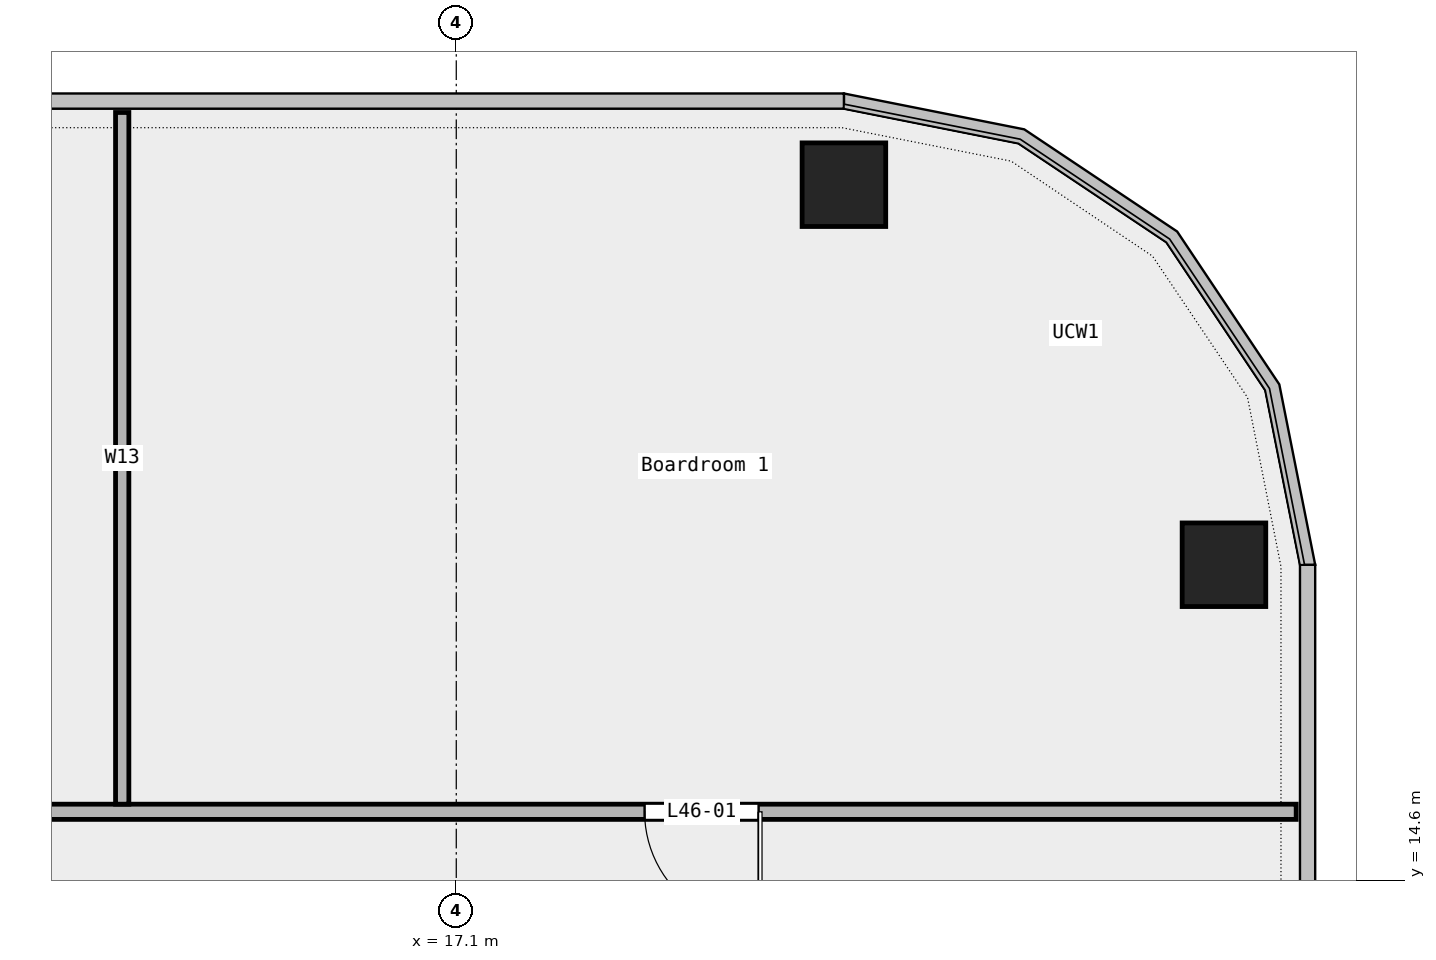
"""IFC4 building model, lengths in metres.
Left out: names, types, materials, properties, quantities, classifications, styles, units other than length and angle.
Written with IfcOpenShell. Run it as: python <this file> out.ifc"""

import sys

from ifc_helpers import new_model, si_unit, direction, frame, frame_2d, origin, origin_2d, place, context, subcontext, project, spatial, rectangle, extrude, element, fill, save


model = new_model("IFC4")
c1 = context("Model", 3, precision=1e-05, world=origin(), true_north=direction((0.0, 1.0)))
c2 = subcontext(c1, "Body", "Model", "MODEL_VIEW")
j1 = project(units=[si_unit("LENGTHUNIT", "METRE"), si_unit("PLANEANGLEUNIT", "RADIAN")], contexts=[c1])
p1 = place(None, origin())
s1 = spatial("IfcSite", under=j1, at=p1, CompositionType="ELEMENT")
p2 = place(p1, origin())
s2 = spatial("IfcBuilding", under=s1, at=p2, CompositionType="ELEMENT")
p3 = place(p2, frame((0.0, 0.0, 219.0)))
s3 = spatial("IfcBuildingStorey", under=s2, at=p3, CompositionType="ELEMENT", Elevation=219.0)
for number, where, z_axis, x_axis in (
    (1, (27.2, 18.75, 0.0), (0.0, 0.0, 1.0), (1.0, 0.0, 0.0)),
    (2, (22.2, 23.75, 0.0), (0.0, 0.0, 1.0), (1.0, 0.0, 0.0)),
):
    element("IfcColumn", number, at=place(p3, frame(where, z_axis=z_axis, x_axis=x_axis)), inside=s3, PredefinedType="COLUMN", context=c2, shape_type="SweptSolid", body=[
        extrude(rectangle(XDim=1.1, YDim=1.1, at=origin_2d()), origin(), (0.0, 0.0, 1.0), 3.6),
    ])
p4 = place(p3, frame((-17.76, 15.5, 0.0), z_axis=(0.0, 0.0, 1.0), x_axis=(1.0, 0.0, 0.0)))
e3 = element("IfcWall", 3, at=p4, inside=s3, PredefinedType="PARTITIONING", context=c2, shape_type="SweptSolid", body=[
    extrude(rectangle(XDim=45.91, YDim=0.2, at=frame_2d((22.955, 0.0))), origin(), (0.0, 0.0, 1.0), 3.6),
])
p5 = place(p4, frame((37.337, 0.0, 0.0)))
e4 = element("IfcOpeningElement", 4, at=p5, cuts=e3, PredefinedType="OPENING", context=c2, shape_type="SweptSolid", body=[
    extrude(rectangle(XDim=1.5, YDim=2.1, at=frame_2d((0.75, 1.05))), frame((0.0, 0.112, 0.0), z_axis=(0.0, -1.0, 0.0), x_axis=(1.0, 0.0, 0.0)), (0.0, 0.0, 1.0), 0.224),
])
p6 = place(p4, frame((24.633, 0.0, 0.0)))
e5 = element("IfcOpeningElement", 5, at=p6, cuts=e3, PredefinedType="OPENING", context=c2, shape_type="SweptSolid", body=[
    extrude(rectangle(XDim=1.5, YDim=2.1, at=frame_2d((0.75, 1.05))), frame((0.0, 0.112, 0.0), z_axis=(0.0, -1.0, 0.0), x_axis=(1.0, 0.0, 0.0)), (0.0, 0.0, 1.0), 0.224),
])
p7 = place(p4, frame((5.91, 0.0, 0.0)))
e6 = element("IfcOpeningElement", 6, at=p7, cuts=e3, PredefinedType="OPENING", context=c2, shape_type="SweptSolid", body=[
    extrude(rectangle(XDim=1.5, YDim=2.1, at=frame_2d((0.75, 1.05))), frame((0.0, 0.112, 0.0), z_axis=(0.0, -1.0, 0.0), x_axis=(1.0, 0.0, 0.0)), (0.0, 0.0, 1.0), 0.224),
])
p8 = place(p4, frame((16.21, 0.0, 0.0)))
e7 = element("IfcOpeningElement", 7, at=p8, cuts=e3, PredefinedType="OPENING", context=c2, shape_type="SweptSolid", body=[
    extrude(rectangle(XDim=1.2, YDim=2.1, at=frame_2d((0.6, 1.05))), frame((0.0, 0.112, 0.0), z_axis=(0.0, -1.0, 0.0), x_axis=(1.0, 0.0, 0.0)), (0.0, 0.0, 1.0), 0.224),
])
p9 = place(p3, frame((12.705, 15.6, 0.0), z_axis=(0.0, 0.0, 1.0), x_axis=(0.0, 1.0, 0.0)))
e8 = element("IfcWall", 8, at=p9, inside=s3, PredefinedType="PARTITIONING", context=c2, shape_type="SweptSolid", body=[
    extrude(rectangle(XDim=9.1, YDim=0.175, at=frame_2d((4.55, 0.0))), origin(), (0.0, 0.0, 1.0), 3.6),
])
p10 = place(p5, origin())
e9 = element("IfcDoor", 9, at=p10, inside=s3, OperationType="DOUBLE_DOOR_SINGLE_SWING", PredefinedType="DOOR", context=c2, shape_type="SweptSolid", body=[
    extrude(rectangle(XDim=1.5, YDim=2.1, at=frame_2d((0.75, 1.05))), frame((0.0, 0.025, 0.0), z_axis=(0.0, -1.0, 0.0), x_axis=(1.0, 0.0, 0.0)), (0.0, 0.0, 1.0), 0.05),
])
fill(e4, e9)
save(model, sys.argv[1])
